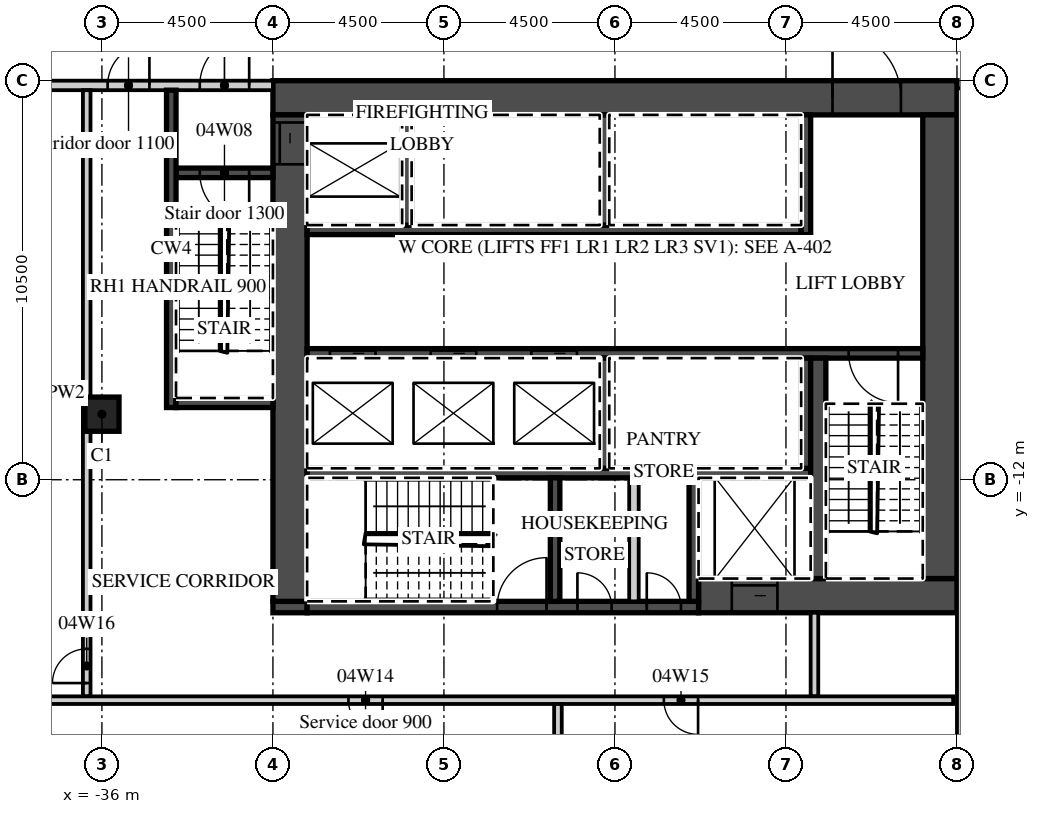
"""IFC4 building model, lengths in metres.
Left out: names, types, materials, properties, quantities, classifications, styles, units other than length and angle.
Written with IfcOpenShell. Run it as: python <this file> out.ifc"""

import sys

from ifc_helpers import new_model, si_unit, direction, frame, frame_2d, origin, origin_2d, place, context, subcontext, project, spatial, rectangle, extrude, element, fill, save


model = new_model("IFC4")
c1 = context("Model", 3, precision=1e-05, world=origin(), true_north=direction((0.0, 1.0)))
c2 = subcontext(c1, "Body", "Model", "MODEL_VIEW")
j1 = project(units=[si_unit("LENGTHUNIT", "METRE"), si_unit("PLANEANGLEUNIT", "RADIAN")], contexts=[c1])
p1 = place(None, origin())
s1 = spatial("IfcSite", under=j1, at=p1, CompositionType="ELEMENT")
p2 = place(p1, origin())
s2 = spatial("IfcBuilding", under=s1, at=p2, CompositionType="ELEMENT")
p3 = place(p2, frame((0.0, 0.0, 29.0)))
s3 = spatial("IfcBuildingStorey", under=s2, at=p3, CompositionType="ELEMENT", Elevation=29.0)
p4 = place(p3, frame((-36.0, -10.275, 0.0), z_axis=(0.0, 0.0, 1.0), x_axis=(1.0, 0.0, 0.0)))
e1 = element("IfcColumn", 1, at=p4, inside=s3, PredefinedType="COLUMN", context=c2, shape_type="SweptSolid", body=[
    extrude(rectangle(XDim=0.9, YDim=0.9, at=origin_2d()), origin(), (0.0, 0.0, 1.0), 4.5),
])
p5 = place(p3, frame((-31.5, -1.95, 0.0), z_axis=(0.0, 0.0, 1.0), x_axis=(1.0, 0.0, 0.0)))
e2 = element("IfcWall", 2, at=p5, inside=s3, PredefinedType="SHEAR", context=c2, shape_type="SweptSolid", body=[
    extrude(rectangle(XDim=18.0, YDim=0.9, at=frame_2d((9.0, 0.0))), origin(), (0.0, 0.0, 1.0), 4.05),
])
p6 = place(p5, frame((14.725, 0.0, 0.0)))
e3 = element("IfcOpeningElement", 3, at=p6, cuts=e2, PredefinedType="OPENING", context=c2, shape_type="SweptSolid", body=[
    extrude(rectangle(XDim=1.8, YDim=2.1, at=frame_2d((0.9, 1.05))), frame((0.0, 0.46, 0.0), z_axis=(0.0, -1.0, 0.0), x_axis=(1.0, 0.0, 0.0)), (0.0, 0.0, 1.0), 0.92),
])
p7 = place(p3, frame((-20.3, -15.05, 0.0), z_axis=(0.0, 0.0, 1.0), x_axis=(1.0, 0.0, 0.0)))
e4 = element("IfcWall", 4, at=p7, inside=s3, PredefinedType="SHEAR", context=c2, shape_type="SweptSolid", body=[
    extrude(rectangle(XDim=6.8, YDim=0.9, at=frame_2d((3.4, 0.0))), origin(), (0.0, 0.0, 1.0), 4.05),
])
p8 = place(p7, frame((0.875, 0.0, 0.0)))
e5 = element("IfcOpeningElement", 5, at=p8, cuts=e4, PredefinedType="OPENING", context=c2, shape_type="SweptSolid", body=[
    extrude(rectangle(XDim=1.2, YDim=2.1, at=frame_2d((0.6, 1.05))), frame((0.0, 0.46, 0.0), z_axis=(0.0, -1.0, 0.0), x_axis=(1.0, 0.0, 0.0)), (0.0, 0.0, 1.0), 0.92),
])
p9 = place(p3, frame((-31.5, -15.35, 0.0), z_axis=(0.0, 0.0, 1.0), x_axis=(1.0, 0.0, 0.0)))
e6 = element("IfcWall", 6, at=p9, inside=s3, PredefinedType="SHEAR", context=c2, shape_type="SweptSolid", body=[
    extrude(rectangle(XDim=0.9, YDim=0.3, at=frame_2d((0.45, 0.0))), origin(), (0.0, 0.0, 1.0), 4.05),
])
p10 = place(p3, frame((-30.6, -15.35, 0.0), z_axis=(0.0, 0.0, 1.0), x_axis=(1.0, 0.0, 0.0)))
e7 = element("IfcWall", 7, at=p10, inside=s3, PredefinedType="SHEAR", context=c2, shape_type="SweptSolid", body=[
    extrude(rectangle(XDim=10.3, YDim=0.3, at=frame_2d((5.15, 0.0))), origin(), (0.0, 0.0, 1.0), 4.05),
])
p11 = place(p10, frame((5.0, 0.0, 0.0)))
e8 = element("IfcOpeningElement", 8, at=p11, cuts=e7, PredefinedType="OPENING", context=c2, shape_type="SweptSolid", body=[
    extrude(rectangle(XDim=1.3, YDim=2.1, at=frame_2d((0.65, 1.05))), frame((0.0, 0.16, 0.0), z_axis=(0.0, -1.0, 0.0), x_axis=(1.0, 0.0, 0.0)), (0.0, 0.0, 1.0), 0.32),
])
p12 = place(p10, frame((7.113, 0.0, 0.0)))
e9 = element("IfcOpeningElement", 9, at=p12, cuts=e7, PredefinedType="OPENING", context=c2, shape_type="SweptSolid", body=[
    extrude(rectangle(XDim=0.9, YDim=2.1, at=frame_2d((0.45, 1.05))), frame((0.0, 0.16, 0.0), z_axis=(0.0, -1.0, 0.0), x_axis=(1.0, 0.0, 0.0)), (0.0, 0.0, 1.0), 0.32),
])
p13 = place(p10, frame((8.938, 0.0, 0.0)))
e10 = element("IfcOpeningElement", 10, at=p13, cuts=e7, PredefinedType="OPENING", context=c2, shape_type="SweptSolid", body=[
    extrude(rectangle(XDim=0.9, YDim=2.1, at=frame_2d((0.45, 1.05))), frame((0.0, 0.16, 0.0), z_axis=(0.0, -1.0, 0.0), x_axis=(1.0, 0.0, 0.0)), (0.0, 0.0, 1.0), 0.32),
])
p14 = place(p3, frame((-31.05, -15.2, 0.0), z_axis=(0.0, 0.0, 1.0), x_axis=(0.0, 1.0, 0.0)))
e11 = element("IfcWall", 11, at=p14, inside=s3, PredefinedType="SHEAR", context=c2, shape_type="SweptSolid", body=[
    extrude(rectangle(XDim=12.8, YDim=0.9, at=frame_2d((6.4, 0.0))), origin(), (0.0, 0.0, 1.0), 4.05),
])
p15 = place(p14, frame((11.5, 0.0, 0.0)))
e12 = element("IfcOpeningElement", 12, at=p15, cuts=e11, PredefinedType="OPENING", context=c2, shape_type="SweptSolid", body=[
    extrude(rectangle(XDim=1.1, YDim=2.1, at=frame_2d((0.55, 1.05))), frame((0.0, 0.46, 0.0), z_axis=(0.0, -1.0, 0.0), x_axis=(1.0, 0.0, 0.0)), (0.0, 0.0, 1.0), 0.92),
])
p16 = place(p3, frame((-13.95, -14.6, 0.0), z_axis=(0.0, 0.0, 1.0), x_axis=(0.0, 1.0, 0.0)))
e13 = element("IfcWall", 13, at=p16, inside=s3, PredefinedType="SHEAR", context=c2, shape_type="SweptSolid", body=[
    extrude(rectangle(XDim=12.2, YDim=0.9, at=frame_2d((6.1, 0.0))), origin(), (0.0, 0.0, 1.0), 4.05),
])
p17 = place(p3, frame((-30.6, -5.425, 0.0), z_axis=(0.0, 0.0, 1.0), x_axis=(1.0, 0.0, 0.0)))
e14 = element("IfcWall", 14, at=p17, inside=s3, PredefinedType="SHEAR", context=c2, shape_type="SweptSolid", body=[
    extrude(rectangle(XDim=13.0, YDim=0.25, at=frame_2d((6.5, 0.0))), origin(), (0.0, 0.0, 1.0), 4.05),
])
p18 = place(p3, frame((-17.475, -5.55, 0.0), z_axis=(0.0, 0.0, 1.0), x_axis=(0.0, 1.0, 0.0)))
e15 = element("IfcWall", 15, at=p18, inside=s3, PredefinedType="SHEAR", context=c2, shape_type="SweptSolid", body=[
    extrude(rectangle(XDim=3.15, YDim=0.25, at=frame_2d((1.575, 0.0))), origin(), (0.0, 0.0, 1.0), 4.05),
])
for number, where, z_axis, x_axis in (
    (16, (-27.975, -5.3, 0.0), (0.0, 0.0, 1.0), (0.0, 1.0, 0.0)),
    (17, (-22.775, -5.3, 0.0), (0.0, 0.0, 1.0), (0.0, 1.0, 0.0)),
):
    element("IfcWall", number, at=place(p3, frame(where, z_axis=z_axis, x_axis=x_axis)), inside=s3, PredefinedType="SHEAR", context=c2, shape_type="SweptSolid", body=[
        extrude(rectangle(XDim=2.9, YDim=0.25, at=frame_2d((1.45, 0.0))), origin(), (0.0, 0.0, 1.0), 4.05),
    ])
p19 = place(p3, frame((-30.6, -8.675, 0.0), z_axis=(0.0, 0.0, 1.0), x_axis=(1.0, 0.0, 0.0)))
e18 = element("IfcWall", 18, at=p19, inside=s3, PredefinedType="SHEAR", context=c2, shape_type="SweptSolid", body=[
    extrude(rectangle(XDim=16.2, YDim=0.25, at=frame_2d((8.1, 0.0))), origin(), (0.0, 0.0, 1.0), 4.05),
])
p20 = place(p19, frame((0.6, 0.0, 0.0)))
e19 = element("IfcOpeningElement", 19, at=p20, cuts=e18, PredefinedType="OPENING", context=c2, shape_type="SweptSolid", body=[
    extrude(rectangle(XDim=1.2, YDim=2.1, at=frame_2d((0.6, 1.05))), frame((0.0, 0.135, 0.0), z_axis=(0.0, -1.0, 0.0), x_axis=(1.0, 0.0, 0.0)), (0.0, 0.0, 1.0), 0.27),
])
p21 = place(p19, frame((3.25, 0.0, 0.0)))
e20 = element("IfcOpeningElement", 20, at=p21, cuts=e18, PredefinedType="OPENING", context=c2, shape_type="SweptSolid", body=[
    extrude(rectangle(XDim=1.2, YDim=2.1, at=frame_2d((0.6, 1.05))), frame((0.0, 0.135, 0.0), z_axis=(0.0, -1.0, 0.0), x_axis=(1.0, 0.0, 0.0)), (0.0, 0.0, 1.0), 0.27),
])
p22 = place(p19, frame((5.9, 0.0, 0.0)))
e21 = element("IfcOpeningElement", 21, at=p22, cuts=e18, PredefinedType="OPENING", context=c2, shape_type="SweptSolid", body=[
    extrude(rectangle(XDim=1.2, YDim=2.1, at=frame_2d((0.6, 1.05))), frame((0.0, 0.135, 0.0), z_axis=(0.0, -1.0, 0.0), x_axis=(1.0, 0.0, 0.0)), (0.0, 0.0, 1.0), 0.27),
])
p23 = place(p19, frame((14.25, 0.0, 0.0)))
e22 = element("IfcOpeningElement", 22, at=p23, cuts=e18, PredefinedType="OPENING", context=c2, shape_type="SweptSolid", body=[
    extrude(rectangle(XDim=1.3, YDim=2.1, at=frame_2d((0.65, 1.05))), frame((0.0, 0.135, 0.0), z_axis=(0.0, -1.0, 0.0), x_axis=(1.0, 0.0, 0.0)), (0.0, 0.0, 1.0), 0.27),
])
p24 = place(p3, frame((-30.6, -11.825, 0.0), z_axis=(0.0, 0.0, 1.0), x_axis=(1.0, 0.0, 0.0)))
e23 = element("IfcWall", 23, at=p24, inside=s3, PredefinedType="SHEAR", context=c2, shape_type="SweptSolid", body=[
    extrude(rectangle(XDim=13.25, YDim=0.25, at=frame_2d((6.625, 0.0))), origin(), (0.0, 0.0, 1.0), 4.05),
])
for number, where, z_axis, x_axis in (
    (24, (-17.475, -11.7, 0.0), (0.0, 0.0, 1.0), (0.0, 1.0, 0.0)),
    (25, (-22.775, -11.7, 0.0), (0.0, 0.0, 1.0), (0.0, 1.0, 0.0)),
):
    element("IfcWall", number, at=place(p3, frame(where, z_axis=z_axis, x_axis=x_axis)), inside=s3, PredefinedType="SHEAR", context=c2, shape_type="SweptSolid", body=[
        extrude(rectangle(XDim=2.9, YDim=0.25, at=frame_2d((1.45, 0.0))), origin(), (0.0, 0.0, 1.0), 4.05),
    ])
p25 = place(p3, frame((-17.15, -14.6, 0.0), z_axis=(0.0, 0.0, 1.0), x_axis=(0.0, 1.0, 0.0)))
e26 = element("IfcWall", 26, at=p25, inside=s3, PredefinedType="SHEAR", context=c2, shape_type="SweptSolid", body=[
    extrude(rectangle(XDim=5.8, YDim=0.4, at=frame_2d((2.9, 0.0))), origin(), (0.0, 0.0, 1.0), 4.05),
])
for number, where, z_axis, x_axis in (
    (27, (-20.425, -15.2, 0.0), (0.0, 0.0, 1.0), (0.0, 1.0, 0.0)),
    (28, (-24.075, -15.2, 0.0), (0.0, 0.0, 1.0), (0.0, 1.0, 0.0)),
):
    element("IfcWall", number, at=place(p3, frame(where, z_axis=z_axis, x_axis=x_axis)), inside=s3, PredefinedType="SHEAR", context=c2, shape_type="SweptSolid", body=[
        extrude(rectangle(XDim=3.25, YDim=0.25, at=frame_2d((1.625, 0.0))), origin(), (0.0, 0.0, 1.0), 4.05),
    ])
p26 = place(p3, frame((-22.0, -15.2, 0.0), z_axis=(0.0, 0.0, 1.0), x_axis=(0.0, 1.0, 0.0)))
e29 = element("IfcWall", 29, at=p26, inside=s3, PredefinedType="PARTITIONING", context=c2, shape_type="SweptSolid", body=[
    extrude(rectangle(XDim=3.25, YDim=0.25, at=frame_2d((1.625, 0.0))), origin(), (0.0, 0.0, 1.0), 4.05),
])
p27 = place(p3, frame((-44.55, -1.625, 0.0), z_axis=(0.0, 0.0, 1.0), x_axis=(1.0, 0.0, 0.0)))
e30 = element("IfcWall", 30, at=p27, inside=s3, PredefinedType="PARTITIONING", context=c2, shape_type="SweptSolid", body=[
    extrude(rectangle(XDim=13.05, YDim=0.25, at=frame_2d((6.525, 0.0))), origin(), (0.0, 0.0, 1.0), 4.05),
])
p28 = place(p27, frame((11.125, 0.0, 0.0)))
e31 = element("IfcOpeningElement", 31, at=p28, cuts=e30, PredefinedType="OPENING", context=c2, shape_type="SweptSolid", body=[
    extrude(rectangle(XDim=1.3, YDim=2.1, at=frame_2d((0.65, 1.05))), frame((0.0, 0.135, 0.0), z_axis=(0.0, -1.0, 0.0), x_axis=(1.0, 0.0, 0.0)), (0.0, 0.0, 1.0), 0.27),
])
p29 = place(p27, frame((8.7, 0.0, 0.0)))
e32 = element("IfcOpeningElement", 32, at=p29, cuts=e30, PredefinedType="OPENING", context=c2, shape_type="SweptSolid", body=[
    extrude(rectangle(XDim=1.1, YDim=2.1, at=frame_2d((0.55, 1.05))), frame((0.0, 0.135, 0.0), z_axis=(0.0, -1.0, 0.0), x_axis=(1.0, 0.0, 0.0)), (0.0, 0.0, 1.0), 0.27),
])
p30 = place(p3, frame((-34.05, -3.925, 0.0), z_axis=(0.0, 0.0, 1.0), x_axis=(1.0, 0.0, 0.0)))
e33 = element("IfcWall", 33, at=p30, inside=s3, PredefinedType="SHEAR", context=c2, shape_type="SweptSolid", body=[
    extrude(rectangle(XDim=2.55, YDim=0.25, at=frame_2d((1.275, 0.0))), origin(), (0.0, 0.0, 1.0), 4.05),
])
p31 = place(p30, frame((0.625, 0.0, 0.0)))
e34 = element("IfcOpeningElement", 34, at=p31, cuts=e33, PredefinedType="OPENING", context=c2, shape_type="SweptSolid", body=[
    extrude(rectangle(XDim=1.3, YDim=2.1, at=frame_2d((0.65, 1.05))), frame((0.0, 0.135, 0.0), z_axis=(0.0, -1.0, 0.0), x_axis=(1.0, 0.0, 0.0)), (0.0, 0.0, 1.0), 0.27),
])
p32 = place(p3, frame((-34.175, -10.1, 0.0), z_axis=(0.0, 0.0, 1.0), x_axis=(0.0, 1.0, 0.0)))
e35 = element("IfcWall", 35, at=p32, inside=s3, PredefinedType="SHEAR", context=c2, shape_type="SweptSolid", body=[
    extrude(rectangle(XDim=8.35, YDim=0.25, at=frame_2d((4.175, 0.0))), origin(), (0.0, 0.0, 1.0), 4.05),
])
p33 = place(p3, frame((-34.05, -9.975, 0.0), z_axis=(0.0, 0.0, 1.0), x_axis=(1.0, 0.0, 0.0)))
e36 = element("IfcWall", 36, at=p33, inside=s3, PredefinedType="SHEAR", context=c2, shape_type="SweptSolid", body=[
    extrude(rectangle(XDim=2.55, YDim=0.25, at=frame_2d((1.275, 0.0))), origin(), (0.0, 0.0, 1.0), 4.05),
])
p34 = place(p3, frame((-17.25, -17.7, 0.0), z_axis=(0.0, 0.0, 1.0), x_axis=(0.0, 1.0, 0.0)))
e37 = element("IfcWall", 37, at=p34, inside=s3, PredefinedType="PARTITIONING", context=c2, shape_type="SweptSolid", body=[
    extrude(rectangle(XDim=2.2, YDim=0.2, at=frame_2d((1.1, 0.0))), origin(), (0.0, 0.0, 1.0), 4.05),
])
p35 = place(p3, frame((-36.4, -17.7, 0.0), z_axis=(0.0, 0.0, 1.0), x_axis=(0.0, 1.0, 0.0)))
e38 = element("IfcWall", 38, at=p35, inside=s3, PredefinedType="PARTITIONING", context=c2, shape_type="SweptSolid", body=[
    extrude(rectangle(XDim=15.95, YDim=0.2, at=frame_2d((7.975, 0.0))), origin(), (0.0, 0.0, 1.0), 4.05),
])
p36 = place(p35, frame((0.35, 0.0, 0.0)))
e39 = element("IfcOpeningElement", 39, at=p36, cuts=e38, PredefinedType="OPENING", context=c2, shape_type="SweptSolid", body=[
    extrude(rectangle(XDim=0.9, YDim=2.1, at=frame_2d((0.45, 1.05))), frame((0.0, 0.11, 0.0), z_axis=(0.0, -1.0, 0.0), x_axis=(1.0, 0.0, 0.0)), (0.0, 0.0, 1.0), 0.22),
])
p37 = place(p3, frame((-44.55, -17.8, 0.0), z_axis=(0.0, 0.0, 1.0), x_axis=(1.0, 0.0, 0.0)))
e40 = element("IfcWall", 40, at=p37, inside=s3, PredefinedType="PARTITIONING", context=c2, shape_type="SweptSolid", body=[
    extrude(rectangle(XDim=30.95, YDim=0.2, at=frame_2d((15.475, 0.0))), origin(), (0.0, 0.0, 1.0), 4.05),
])
p38 = place(p37, frame((15.038, 0.0, 0.0)))
e41 = element("IfcOpeningElement", 41, at=p38, cuts=e40, PredefinedType="OPENING", context=c2, shape_type="SweptSolid", body=[
    extrude(rectangle(XDim=0.9, YDim=2.1, at=frame_2d((0.45, 1.05))), frame((0.0, 0.11, 0.0), z_axis=(0.0, -1.0, 0.0), x_axis=(1.0, 0.0, 0.0)), (0.0, 0.0, 1.0), 0.22),
])
p39 = place(p37, frame((23.337, 0.0, 0.0)))
e42 = element("IfcOpeningElement", 42, at=p39, cuts=e40, PredefinedType="OPENING", context=c2, shape_type="SweptSolid", body=[
    extrude(rectangle(XDim=0.9, YDim=2.1, at=frame_2d((0.45, 1.05))), frame((0.0, 0.11, 0.0), z_axis=(0.0, -1.0, 0.0), x_axis=(1.0, 0.0, 0.0)), (0.0, 0.0, 1.0), 0.22),
])
p40 = place(p3, frame((-24.0, -21.55, 0.0), z_axis=(0.0, 0.0, 1.0), x_axis=(0.0, 1.0, 0.0)))
e43 = element("IfcWall", 43, at=p40, inside=s3, PredefinedType="PARTITIONING", context=c2, shape_type="SweptSolid", body=[
    extrude(rectangle(XDim=3.65, YDim=0.2, at=frame_2d((1.825, 0.0))), origin(), (0.0, 0.0, 1.0), 4.05),
])
p41 = place(p3, frame((-13.4, -21.55, 0.0), z_axis=(0.0, 0.0, 1.0), x_axis=(0.0, 1.0, 0.0)))
e44 = element("IfcWall", 44, at=p41, inside=s3, PredefinedType="PARTITIONING", context=c2, shape_type="SweptSolid", body=[
    extrude(rectangle(XDim=19.85, YDim=0.2, at=frame_2d((9.925, 0.0))), origin(), (0.0, 0.0, 1.0), 4.05),
])
p42 = place(p20, origin())
e45 = element("IfcDoor", 45, at=p42, inside=s3, OperationType="SLIDING_TO_LEFT", PredefinedType="DOOR", context=c2, shape_type="SweptSolid", body=[
    extrude(rectangle(XDim=1.2, YDim=2.1, at=frame_2d((0.6, 1.05))), frame((0.0, 0.025, 0.0), z_axis=(0.0, -1.0, 0.0), x_axis=(1.0, 0.0, 0.0)), (0.0, 0.0, 1.0), 0.05),
])
fill(e19, e45)
p43 = place(p21, origin())
e46 = element("IfcDoor", 46, at=p43, inside=s3, OperationType="SLIDING_TO_RIGHT", PredefinedType="DOOR", context=c2, shape_type="SweptSolid", body=[
    extrude(rectangle(XDim=1.2, YDim=2.1, at=frame_2d((0.6, 1.05))), frame((0.0, 0.025, 0.0), z_axis=(0.0, -1.0, 0.0), x_axis=(1.0, 0.0, 0.0)), (0.0, 0.0, 1.0), 0.05),
])
fill(e20, e46)
p44 = place(p22, origin())
e47 = element("IfcDoor", 47, at=p44, inside=s3, OperationType="SLIDING_TO_RIGHT", PredefinedType="DOOR", context=c2, shape_type="SweptSolid", body=[
    extrude(rectangle(XDim=1.2, YDim=2.1, at=frame_2d((0.6, 1.05))), frame((0.0, 0.025, 0.0), z_axis=(0.0, -1.0, 0.0), x_axis=(1.0, 0.0, 0.0)), (0.0, 0.0, 1.0), 0.05),
])
fill(e21, e47)
p45 = place(p8, origin())
e48 = element("IfcDoor", 48, at=p45, inside=s3, OperationType="SLIDING_TO_LEFT", PredefinedType="DOOR", context=c2, shape_type="SweptSolid", body=[
    extrude(rectangle(XDim=1.2, YDim=2.1, at=frame_2d((0.6, 1.05))), frame((0.0, 0.025, 0.0), z_axis=(0.0, -1.0, 0.0), x_axis=(1.0, 0.0, 0.0)), (0.0, 0.0, 1.0), 0.05),
])
fill(e5, e48)
p46 = place(p15, origin())
e49 = element("IfcDoor", 49, at=p46, inside=s3, OperationType="SLIDING_TO_RIGHT", PredefinedType="DOOR", context=c2, shape_type="SweptSolid", body=[
    extrude(rectangle(XDim=1.1, YDim=2.1, at=frame_2d((0.55, 1.05))), frame((0.0, 0.025, 0.0), z_axis=(0.0, -1.0, 0.0), x_axis=(1.0, 0.0, 0.0)), (0.0, 0.0, 1.0), 0.05),
])
fill(e12, e49)
p47 = place(p6, origin())
e50 = element("IfcDoor", 50, at=p47, inside=s3, OperationType="DOUBLE_DOOR_DOUBLE_SWING", PredefinedType="DOOR", context=c2, shape_type="SweptSolid", body=[
    extrude(rectangle(XDim=1.8, YDim=2.1, at=frame_2d((0.9, 1.05))), frame((0.0, 0.025, 0.0), z_axis=(0.0, -1.0, 0.0), x_axis=(1.0, 0.0, 0.0)), (0.0, 0.0, 1.0), 0.05),
])
fill(e3, e50)
p48 = place(p28, origin())
e51 = element("IfcDoor", 51, at=p48, inside=s3, OperationType="SINGLE_SWING_RIGHT", PredefinedType="DOOR", context=c2, shape_type="SweptSolid", body=[
    extrude(rectangle(XDim=1.3, YDim=2.1, at=frame_2d((0.65, 1.05))), frame((0.0, 0.025, 0.0), z_axis=(0.0, -1.0, 0.0), x_axis=(1.0, 0.0, 0.0)), (0.0, 0.0, 1.0), 0.05),
])
fill(e31, e51)
p49 = place(p31, origin())
e52 = element("IfcDoor", 52, at=p49, inside=s3, OperationType="SINGLE_SWING_RIGHT", PredefinedType="DOOR", context=c2, shape_type="SweptSolid", body=[
    extrude(rectangle(XDim=1.3, YDim=2.1, at=frame_2d((0.65, 1.05))), frame((0.0, 0.025, 0.0), z_axis=(0.0, -1.0, 0.0), x_axis=(1.0, 0.0, 0.0)), (0.0, 0.0, 1.0), 0.05),
])
fill(e34, e52)
p50 = place(p29, origin())
e53 = element("IfcDoor", 53, at=p50, inside=s3, OperationType="SINGLE_SWING_RIGHT", PredefinedType="DOOR", context=c2, shape_type="SweptSolid", body=[
    extrude(rectangle(XDim=1.1, YDim=2.1, at=frame_2d((0.55, 1.05))), frame((0.0, 0.025, 0.0), z_axis=(0.0, -1.0, 0.0), x_axis=(1.0, 0.0, 0.0)), (0.0, 0.0, 1.0), 0.05),
])
fill(e32, e53)
p51 = place(p23, origin())
e54 = element("IfcDoor", 54, at=p51, inside=s3, OperationType="SINGLE_SWING_RIGHT", PredefinedType="DOOR", context=c2, shape_type="SweptSolid", body=[
    extrude(rectangle(XDim=1.3, YDim=2.1, at=frame_2d((0.65, 1.05))), frame((0.0, 0.025, 0.0), z_axis=(0.0, -1.0, 0.0), x_axis=(1.0, 0.0, 0.0)), (0.0, 0.0, 1.0), 0.05),
])
fill(e22, e54)
p52 = place(p11, origin())
e55 = element("IfcDoor", 55, at=p52, inside=s3, OperationType="SINGLE_SWING_RIGHT", PredefinedType="DOOR", context=c2, shape_type="SweptSolid", body=[
    extrude(rectangle(XDim=1.3, YDim=2.1, at=frame_2d((0.65, 1.05))), frame((0.0, 0.025, 0.0), z_axis=(0.0, -1.0, 0.0), x_axis=(1.0, 0.0, 0.0)), (0.0, 0.0, 1.0), 0.05),
])
fill(e8, e55)
p53 = place(p12, origin())
e56 = element("IfcDoor", 56, at=p53, inside=s3, OperationType="SINGLE_SWING_LEFT", PredefinedType="DOOR", context=c2, shape_type="SweptSolid", body=[
    extrude(rectangle(XDim=0.9, YDim=2.1, at=frame_2d((0.45, 1.05))), frame((0.0, 0.025, 0.0), z_axis=(0.0, -1.0, 0.0), x_axis=(1.0, 0.0, 0.0)), (0.0, 0.0, 1.0), 0.05),
])
fill(e9, e56)
p54 = place(p13, origin())
e57 = element("IfcDoor", 57, at=p54, inside=s3, OperationType="SINGLE_SWING_LEFT", PredefinedType="DOOR", context=c2, shape_type="SweptSolid", body=[
    extrude(rectangle(XDim=0.9, YDim=2.1, at=frame_2d((0.45, 1.05))), frame((0.0, 0.025, 0.0), z_axis=(0.0, -1.0, 0.0), x_axis=(1.0, 0.0, 0.0)), (0.0, 0.0, 1.0), 0.05),
])
fill(e10, e57)
p55 = place(p38, origin())
e58 = element("IfcDoor", 58, at=p55, inside=s3, OperationType="SINGLE_SWING_RIGHT", PredefinedType="DOOR", context=c2, shape_type="SweptSolid", body=[
    extrude(rectangle(XDim=0.9, YDim=2.1, at=frame_2d((0.45, 1.05))), frame((0.0, 0.025, 0.0), z_axis=(0.0, -1.0, 0.0), x_axis=(1.0, 0.0, 0.0)), (0.0, 0.0, 1.0), 0.05),
])
fill(e41, e58)
p56 = place(p39, origin())
e59 = element("IfcDoor", 59, at=p56, inside=s3, OperationType="SINGLE_SWING_RIGHT", PredefinedType="DOOR", context=c2, shape_type="SweptSolid", body=[
    extrude(rectangle(XDim=0.9, YDim=2.1, at=frame_2d((0.45, 1.05))), frame((0.0, 0.025, 0.0), z_axis=(0.0, -1.0, 0.0), x_axis=(1.0, 0.0, 0.0)), (0.0, 0.0, 1.0), 0.05),
])
fill(e42, e59)
p57 = place(p36, origin())
e60 = element("IfcDoor", 60, at=p57, inside=s3, OperationType="SINGLE_SWING_LEFT", PredefinedType="DOOR", context=c2, shape_type="SweptSolid", body=[
    extrude(rectangle(XDim=0.9, YDim=2.1, at=frame_2d((0.45, 1.05))), frame((0.0, 0.025, 0.0), z_axis=(0.0, -1.0, 0.0), x_axis=(1.0, 0.0, 0.0)), (0.0, 0.0, 1.0), 0.05),
])
fill(e39, e60)
save(model, sys.argv[1])
